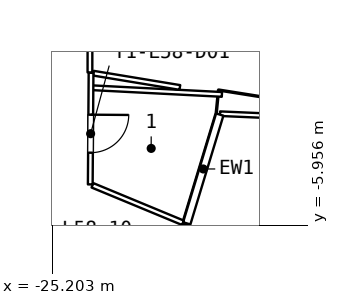
"""IFC4 building model, lengths in metres.
Left out: names, types, materials, properties, quantities, classifications, styles, units other than length and angle.
Written with IfcOpenShell. Run it as: python <this file> out.ifc"""

import sys

from ifc_helpers import new_model, si_unit, direction, frame, frame_2d, origin, place, context, subcontext, project, spatial, rectangle, extrude, element, fill, save


model = new_model("IFC4")
c1 = context("Model", 3, precision=1e-05, world=origin(), true_north=direction((0.0, 1.0)))
c2 = subcontext(c1, "Body", "Model", "MODEL_VIEW")
j1 = project(units=[si_unit("LENGTHUNIT", "METRE"), si_unit("PLANEANGLEUNIT", "RADIAN")], contexts=[c1])
p1 = place(None, origin())
s1 = spatial("IfcSite", under=j1, at=p1, CompositionType="ELEMENT")
p2 = place(p1, origin())
s2 = spatial("IfcBuilding", under=s1, at=p2, CompositionType="ELEMENT")
p3 = place(p2, frame((0.0, 0.0, 240.6)))
s3 = spatial("IfcBuildingStorey", under=s2, at=p3, CompositionType="ELEMENT", Elevation=240.6)
p4 = place(p3, frame((-20.795, -3.05, 0.0), z_axis=(0.0, 0.0, 1.0), x_axis=(-0.290222640036, -0.956959152321, 0.0)))
e1 = element("IfcWall", 1, at=p4, inside=s3, PredefinedType="SOLIDWALL", context=c2, shape_type="SweptSolid", body=[
    extrude(rectangle(XDim=2.99, YDim=0.2, at=frame_2d((1.495, 0.0))), origin(), (0.0, 0.0, 1.0), 7.5),
])
p5 = place(p4, frame((0.595, 0.0, 0.0)))
e2 = element("IfcOpeningElement", 2, at=p5, cuts=e1, PredefinedType="OPENING", context=c2, shape_type="SweptSolid", body=[
    extrude(rectangle(XDim=1.8, YDim=2.4, at=frame_2d((0.9, 1.2))), frame((0.0, 0.11, 0.0), z_axis=(0.0, -1.0, 0.0), x_axis=(1.0, 0.0, 0.0)), (0.0, 0.0, 1.0), 0.22),
])
p6 = place(p2, frame((0.0, 0.0, 244.5)))
s4 = spatial("IfcBuildingStorey", under=s2, at=p6, CompositionType="ELEMENT", Elevation=244.5)
p7 = place(p6, frame((-21.763, -5.897, 0.0), z_axis=(0.0, 0.0, 1.0), x_axis=(-0.923865536241, 0.382717220603, 0.0)))
e3 = element("IfcWall", 3, at=p7, inside=s4, PredefinedType="PARTITIONING", context=c2, shape_type="SweptSolid", body=[
    extrude(rectangle(XDim=2.576, YDim=0.125, at=frame_2d((1.288, 0.0))), origin(), (0.0, 0.0, 1.0), 2.4),
])
p8 = place(p6, frame((-20.738, -2.519, 0.0), z_axis=(0.0, 0.0, 1.0), x_axis=(-0.99869028618, 0.051163583637, 0.0)))
e4 = element("IfcWall", 4, at=p8, inside=s4, PredefinedType="PARTITIONING", context=c2, shape_type="SweptSolid", body=[
    extrude(rectangle(XDim=3.417, YDim=0.125, at=frame_2d((1.708, 0.0))), origin(), (0.0, 0.0, 1.0), 3.6),
])
p9 = place(p6, frame((-21.844, -2.336, 0.0), z_axis=(0.0, 0.0, 1.0), x_axis=(-0.986650274998, 0.162853415212, 0.0)))
e5 = element("IfcWall", 5, at=p9, inside=s4, PredefinedType="PARTITIONING", context=c2, shape_type="SweptSolid", body=[
    extrude(rectangle(XDim=2.306, YDim=0.125, at=frame_2d((1.153, 0.0))), origin(), (0.0, 0.0, 1.0), 3.6),
])
p10 = place(p6, frame((-24.181, -1.95, 0.0), z_axis=(0.0, 0.0, 1.0), x_axis=(-0.007066667577, -0.999975030793, 0.0)))
e6 = element("IfcWall", 6, at=p10, inside=s4, PredefinedType="PARTITIONING", context=c2, shape_type="SweptSolid", body=[
    extrude(rectangle(XDim=2.937, YDim=0.125, at=frame_2d((1.468, 0.0))), origin(), (0.0, 0.0, 1.0), 2.4),
])
p11 = place(p10, frame((1.102, 0.0, 0.0)))
e7 = element("IfcOpeningElement", 7, at=p11, cuts=e6, PredefinedType="OPENING", context=c2, shape_type="SweptSolid", body=[
    extrude(rectangle(XDim=1.0, YDim=2.1, at=frame_2d((0.5, 1.05))), frame((0.0, 0.073, 0.0), z_axis=(0.0, -1.0, 0.0), x_axis=(1.0, 0.0, 0.0)), (0.0, 0.0, 1.0), 0.145),
])
p12 = place(p6, frame((-24.201, 4.887, 0.0), z_axis=(0.0, 0.0, 1.0), x_axis=(-0.001358888747, -0.99999907671, 0.0)))
e8 = element("IfcWall", 8, at=p12, inside=s4, PredefinedType="PARTITIONING", context=c2, shape_type="SweptSolid", body=[
    extrude(rectangle(XDim=6.827, YDim=0.125, at=frame_2d((3.414, 0.0))), origin(), (0.0, 0.0, 1.0), 2.4),
])
p13 = place(p12, frame((2.614, 0.0, 0.0)))
e9 = element("IfcOpeningElement", 9, at=p13, cuts=e8, PredefinedType="OPENING", context=c2, shape_type="SweptSolid", body=[
    extrude(rectangle(XDim=1.8, YDim=2.1, at=frame_2d((0.9, 1.05))), frame((0.0, 0.073, 0.0), z_axis=(0.0, -1.0, 0.0), x_axis=(1.0, 0.0, 0.0)), (0.0, 0.0, 1.0), 0.145),
])
p14 = place(p11, origin())
e10 = element("IfcDoor", 10, at=p14, inside=s4, OperationType="SINGLE_SWING_LEFT", PredefinedType="DOOR", context=c2, shape_type="SweptSolid", body=[
    extrude(rectangle(XDim=1.0, YDim=2.1, at=frame_2d((0.5, 1.05))), frame((0.0, 0.025, 0.0), z_axis=(0.0, -1.0, 0.0), x_axis=(1.0, 0.0, 0.0)), (0.0, 0.0, 1.0), 0.05),
])
fill(e7, e10)
save(model, sys.argv[1])
